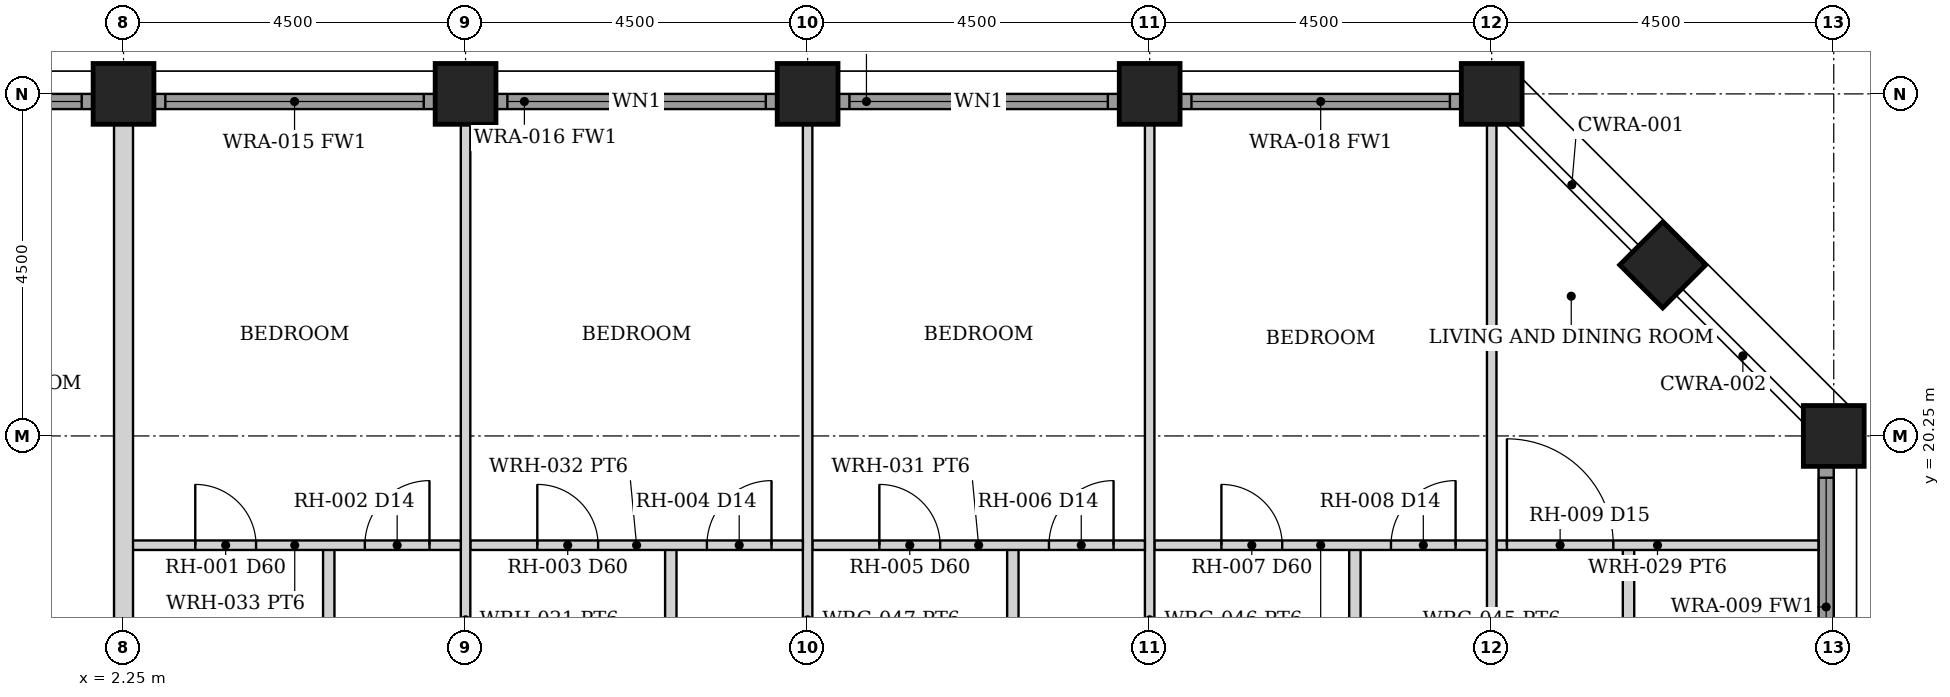
"""IFC4 building model, lengths in metres.
Left out: names, types, materials, properties, quantities, classifications, styles, units other than length and angle.
Written with IfcOpenShell. Run it as: python <this file> out.ifc"""

import sys

from ifc_helpers import new_model, si_unit, direction, frame, frame_2d, origin, origin_2d, place, context, subcontext, project, spatial, rectangle, hollow_rectangle, extrude, element, fill, save


model = new_model("IFC4")
c1 = context("Model", 3, precision=1e-05, world=origin(), true_north=direction((0.0, 1.0)))
c2 = subcontext(c1, "Body", "Model", "MODEL_VIEW")
j1 = project(units=[si_unit("LENGTHUNIT", "METRE"), si_unit("PLANEANGLEUNIT", "RADIAN")], contexts=[c1])
p1 = place(None, origin())
s1 = spatial("IfcSite", under=j1, at=p1, CompositionType="ELEMENT")
p2 = place(p1, origin())
s2 = spatial("IfcBuilding", under=s1, at=p2, CompositionType="ELEMENT")
p3 = place(p2, frame((0.0, 0.0, 100.0)))
s3 = spatial("IfcBuildingStorey", under=s2, at=p3, CompositionType="ELEMENT", Elevation=100.0)
for number, where, z_axis, x_axis in (
    (1, (2.25, 24.75, 0.0), (0.0, 0.0, 1.0), (0.0, 1.0, 0.0)),
    (2, (6.75, 24.75, 0.0), (0.0, 0.0, 1.0), (0.0, 1.0, 0.0)),
    (3, (11.25, 24.75, 0.0), (0.0, 0.0, 1.0), (0.0, 1.0, 0.0)),
    (4, (15.75, 24.75, 0.0), (0.0, 0.0, 1.0), (0.0, 1.0, 0.0)),
    (5, (20.25, 24.75, 0.0), (0.0, 0.0, 1.0), (0.0, 1.0, 0.0)),
    (6, (24.75, 20.25, 0.0), (0.0, 0.0, 1.0), (1.0, 0.0, 0.0)),
    (7, (22.5, 22.5, 0.0), (0.0, 0.0, 1.0), (0.707, 0.707, 0.0)),
):
    element("IfcColumn", number, at=place(p3, frame(where, z_axis=z_axis, x_axis=x_axis)), inside=s3, PredefinedType="COLUMN", context=c2, shape_type="SweptSolid", body=[
        extrude(hollow_rectangle(XDim=0.8, YDim=0.8, WallThickness=0.06, at=origin_2d()), origin(), (0.0, 0.0, 1.0), 3.5),
    ])
p4 = place(p3, frame((24.65, 16.155, 0.0), z_axis=(0.0, 0.0, 1.0), x_axis=(0.0, 1.0, 0.0)))
e8 = element("IfcWall", 8, at=p4, inside=s3, PredefinedType="SOLIDWALL", context=c2, shape_type="SweptSolid", body=[
    extrude(rectangle(XDim=3.69, YDim=0.2, at=frame_2d((1.845, 0.0))), origin(), (0.0, 0.0, 1.0), 2.379),
])
p5 = place(p4, frame((0.145, 0.0, 0.3)))
e9 = element("IfcOpeningElement", 9, at=p5, cuts=e8, PredefinedType="OPENING", context=c2, shape_type="SweptSolid", body=[
    extrude(rectangle(XDim=3.4, YDim=1.929, at=frame_2d((1.7, 0.964))), frame((0.0, 0.11, 0.0), z_axis=(0.0, -1.0, 0.0), x_axis=(1.0, 0.0, 0.0)), (0.0, 0.0, 1.0), 0.22),
])
p6 = place(p3, frame((-1.845, 24.65, 0.0), z_axis=(0.0, 0.0, 1.0), x_axis=(1.0, 0.0, 0.0)))
e10 = element("IfcWall", 10, at=p6, inside=s3, PredefinedType="SOLIDWALL", context=c2, shape_type="SweptSolid", body=[
    extrude(rectangle(XDim=3.69, YDim=0.2, at=frame_2d((1.845, 0.0))), origin(), (0.0, 0.0, 1.0), 2.379),
])
p7 = place(p6, frame((0.145, 0.0, 0.3)))
e11 = element("IfcOpeningElement", 11, at=p7, cuts=e10, PredefinedType="OPENING", context=c2, shape_type="SweptSolid", body=[
    extrude(rectangle(XDim=3.4, YDim=1.929, at=frame_2d((1.7, 0.964))), frame((0.0, 0.11, 0.0), z_axis=(0.0, -1.0, 0.0), x_axis=(1.0, 0.0, 0.0)), (0.0, 0.0, 1.0), 0.22),
])
p8 = place(p3, frame((2.655, 24.65, 0.0), z_axis=(0.0, 0.0, 1.0), x_axis=(1.0, 0.0, 0.0)))
e12 = element("IfcWall", 12, at=p8, inside=s3, PredefinedType="SOLIDWALL", context=c2, shape_type="SweptSolid", body=[
    extrude(rectangle(XDim=3.69, YDim=0.2, at=frame_2d((1.845, 0.0))), origin(), (0.0, 0.0, 1.0), 2.379),
])
p9 = place(p8, frame((0.145, 0.0, 0.3)))
e13 = element("IfcOpeningElement", 13, at=p9, cuts=e12, PredefinedType="OPENING", context=c2, shape_type="SweptSolid", body=[
    extrude(rectangle(XDim=3.4, YDim=1.929, at=frame_2d((1.7, 0.964))), frame((0.0, 0.11, 0.0), z_axis=(0.0, -1.0, 0.0), x_axis=(1.0, 0.0, 0.0)), (0.0, 0.0, 1.0), 0.22),
])
p10 = place(p3, frame((7.155, 24.65, 0.0), z_axis=(0.0, 0.0, 1.0), x_axis=(1.0, 0.0, 0.0)))
e14 = element("IfcWall", 14, at=p10, inside=s3, PredefinedType="SOLIDWALL", context=c2, shape_type="SweptSolid", body=[
    extrude(rectangle(XDim=3.69, YDim=0.2, at=frame_2d((1.845, 0.0))), origin(), (0.0, 0.0, 1.0), 2.379),
])
p11 = place(p10, frame((0.145, 0.0, 0.3)))
e15 = element("IfcOpeningElement", 15, at=p11, cuts=e14, PredefinedType="OPENING", context=c2, shape_type="SweptSolid", body=[
    extrude(rectangle(XDim=3.4, YDim=1.929, at=frame_2d((1.7, 0.964))), frame((0.0, 0.11, 0.0), z_axis=(0.0, -1.0, 0.0), x_axis=(1.0, 0.0, 0.0)), (0.0, 0.0, 1.0), 0.22),
])
p12 = place(p3, frame((11.655, 24.65, 0.0), z_axis=(0.0, 0.0, 1.0), x_axis=(1.0, 0.0, 0.0)))
e16 = element("IfcWall", 16, at=p12, inside=s3, PredefinedType="SOLIDWALL", context=c2, shape_type="SweptSolid", body=[
    extrude(rectangle(XDim=3.69, YDim=0.2, at=frame_2d((1.845, 0.0))), origin(), (0.0, 0.0, 1.0), 2.379),
])
p13 = place(p12, frame((0.145, 0.0, 0.3)))
e17 = element("IfcOpeningElement", 17, at=p13, cuts=e16, PredefinedType="OPENING", context=c2, shape_type="SweptSolid", body=[
    extrude(rectangle(XDim=3.4, YDim=1.929, at=frame_2d((1.7, 0.964))), frame((0.0, 0.11, 0.0), z_axis=(0.0, -1.0, 0.0), x_axis=(1.0, 0.0, 0.0)), (0.0, 0.0, 1.0), 0.22),
])
p14 = place(p3, frame((16.155, 24.65, 0.0), z_axis=(0.0, 0.0, 1.0), x_axis=(1.0, 0.0, 0.0)))
e18 = element("IfcWall", 18, at=p14, inside=s3, PredefinedType="SOLIDWALL", context=c2, shape_type="SweptSolid", body=[
    extrude(rectangle(XDim=3.69, YDim=0.2, at=frame_2d((1.845, 0.0))), origin(), (0.0, 0.0, 1.0), 2.379),
])
p15 = place(p14, frame((0.145, 0.0, 0.3)))
e19 = element("IfcOpeningElement", 19, at=p15, cuts=e18, PredefinedType="OPENING", context=c2, shape_type="SweptSolid", body=[
    extrude(rectangle(XDim=3.4, YDim=1.929, at=frame_2d((1.7, 0.964))), frame((0.0, 0.11, 0.0), z_axis=(0.0, -1.0, 0.0), x_axis=(1.0, 0.0, 0.0)), (0.0, 0.0, 1.0), 0.22),
])
p16 = place(p3, frame((22.05, 11.312, 0.0), z_axis=(0.0, 0.0, 1.0), x_axis=(0.0, 1.0, 0.0)))
e20 = element("IfcWall", 20, at=p16, inside=s3, PredefinedType="PARTITIONING", context=c2, shape_type="SweptSolid", body=[
    extrude(rectangle(XDim=7.5, YDim=0.15, at=frame_2d((3.75, 0.0))), origin(), (0.0, 0.0, 1.0), 2.373),
])
p17 = place(p16, frame((3.3, 0.0, 0.0)))
e21 = element("IfcOpeningElement", 21, at=p17, cuts=e20, PredefinedType="OPENING", context=c2, shape_type="SweptSolid", body=[
    extrude(rectangle(XDim=0.9, YDim=2.1, at=frame_2d((0.45, 1.05))), frame((0.0, 0.085, 0.0), z_axis=(0.0, -1.0, 0.0), x_axis=(1.0, 0.0, 0.0)), (0.0, 0.0, 1.0), 0.17),
])
p18 = place(p3, frame((20.312, 18.812, 0.0), z_axis=(0.0, 0.0, 1.0), x_axis=(1.0, 0.0, 0.0)))
e22 = element("IfcWall", 22, at=p18, inside=s3, PredefinedType="PARTITIONING", context=c2, shape_type="SweptSolid", body=[
    extrude(rectangle(XDim=4.238, YDim=0.125, at=frame_2d((2.119, 0.0))), origin(), (0.0, 0.0, 1.0), 2.373),
])
p19 = place(p18, frame((0.137, 0.0, 0.0)))
e23 = element("IfcOpeningElement", 23, at=p19, cuts=e22, PredefinedType="OPENING", context=c2, shape_type="SweptSolid", body=[
    extrude(rectangle(XDim=1.4, YDim=2.1, at=frame_2d((0.7, 1.05))), frame((0.0, 0.073, 0.0), z_axis=(0.0, -1.0, 0.0), x_axis=(1.0, 0.0, 0.0)), (0.0, 0.0, 1.0), 0.145),
])
p20 = place(p3, frame((20.25, 11.312, 0.0), z_axis=(0.0, 0.0, 1.0), x_axis=(0.0, 1.0, 0.0)))
e24 = element("IfcWall", 24, at=p20, inside=s3, PredefinedType="PARTITIONING", context=c2, shape_type="SweptSolid", body=[
    extrude(rectangle(XDim=13.038, YDim=0.125, at=frame_2d((6.519, 0.0))), origin(), (0.0, 0.0, 1.0), 2.373),
])
p21 = place(p3, frame((18.45, 11.312, 0.0), z_axis=(0.0, 0.0, 1.0), x_axis=(0.0, 1.0, 0.0)))
e25 = element("IfcWall", 25, at=p21, inside=s3, PredefinedType="PARTITIONING", context=c2, shape_type="SweptSolid", body=[
    extrude(rectangle(XDim=7.5, YDim=0.15, at=frame_2d((3.75, 0.0))), origin(), (0.0, 0.0, 1.0), 2.373),
])
p22 = place(p21, frame((0.9, 0.0, 0.0)))
e26 = element("IfcOpeningElement", 26, at=p22, cuts=e25, PredefinedType="OPENING", context=c2, shape_type="SweptSolid", body=[
    extrude(rectangle(XDim=0.8, YDim=2.1, at=frame_2d((0.4, 1.05))), frame((0.0, 0.085, 0.0), z_axis=(0.0, -1.0, 0.0), x_axis=(1.0, 0.0, 0.0)), (0.0, 0.0, 1.0), 0.17),
])
p23 = place(p3, frame((15.812, 18.812, 0.0), z_axis=(0.0, 0.0, 1.0), x_axis=(1.0, 0.0, 0.0)))
e27 = element("IfcWall", 27, at=p23, inside=s3, PredefinedType="PARTITIONING", context=c2, shape_type="SweptSolid", body=[
    extrude(rectangle(XDim=4.375, YDim=0.125, at=frame_2d((2.188, 0.0))), origin(), (0.0, 0.0, 1.0), 2.373),
])
p24 = place(p23, frame((3.113, 0.0, 0.0)))
e28 = element("IfcOpeningElement", 28, at=p24, cuts=e27, PredefinedType="OPENING", context=c2, shape_type="SweptSolid", body=[
    extrude(rectangle(XDim=0.85, YDim=2.1, at=frame_2d((0.425, 1.05))), frame((0.0, 0.073, 0.0), z_axis=(0.0, -1.0, 0.0), x_axis=(1.0, 0.0, 0.0)), (0.0, 0.0, 1.0), 0.145),
])
p25 = place(p23, frame((0.881, 0.0, 0.0)))
e29 = element("IfcOpeningElement", 29, at=p25, cuts=e27, PredefinedType="OPENING", context=c2, shape_type="SweptSolid", body=[
    extrude(rectangle(XDim=0.8, YDim=2.1, at=frame_2d((0.4, 1.05))), frame((0.0, 0.073, 0.0), z_axis=(0.0, -1.0, 0.0), x_axis=(1.0, 0.0, 0.0)), (0.0, 0.0, 1.0), 0.145),
])
p26 = place(p3, frame((15.75, 11.312, 0.0), z_axis=(0.0, 0.0, 1.0), x_axis=(0.0, 1.0, 0.0)))
e30 = element("IfcWall", 30, at=p26, inside=s3, PredefinedType="PARTITIONING", context=c2, shape_type="SweptSolid", body=[
    extrude(rectangle(XDim=13.038, YDim=0.125, at=frame_2d((6.519, 0.0))), origin(), (0.0, 0.0, 1.0), 2.373),
])
p27 = place(p3, frame((13.95, 11.312, 0.0), z_axis=(0.0, 0.0, 1.0), x_axis=(0.0, 1.0, 0.0)))
e31 = element("IfcWall", 31, at=p27, inside=s3, PredefinedType="PARTITIONING", context=c2, shape_type="SweptSolid", body=[
    extrude(rectangle(XDim=7.5, YDim=0.15, at=frame_2d((3.75, 0.0))), origin(), (0.0, 0.0, 1.0), 2.373),
])
p28 = place(p27, frame((0.9, 0.0, 0.0)))
e32 = element("IfcOpeningElement", 32, at=p28, cuts=e31, PredefinedType="OPENING", context=c2, shape_type="SweptSolid", body=[
    extrude(rectangle(XDim=0.8, YDim=2.1, at=frame_2d((0.4, 1.05))), frame((0.0, 0.085, 0.0), z_axis=(0.0, -1.0, 0.0), x_axis=(1.0, 0.0, 0.0)), (0.0, 0.0, 1.0), 0.17),
])
p29 = place(p3, frame((11.312, 18.812, 0.0), z_axis=(0.0, 0.0, 1.0), x_axis=(1.0, 0.0, 0.0)))
e33 = element("IfcWall", 33, at=p29, inside=s3, PredefinedType="PARTITIONING", context=c2, shape_type="SweptSolid", body=[
    extrude(rectangle(XDim=4.375, YDim=0.125, at=frame_2d((2.188, 0.0))), origin(), (0.0, 0.0, 1.0), 2.373),
])
p30 = place(p29, frame((3.113, 0.0, 0.0)))
e34 = element("IfcOpeningElement", 34, at=p30, cuts=e33, PredefinedType="OPENING", context=c2, shape_type="SweptSolid", body=[
    extrude(rectangle(XDim=0.85, YDim=2.1, at=frame_2d((0.425, 1.05))), frame((0.0, 0.073, 0.0), z_axis=(0.0, -1.0, 0.0), x_axis=(1.0, 0.0, 0.0)), (0.0, 0.0, 1.0), 0.145),
])
p31 = place(p29, frame((0.881, 0.0, 0.0)))
e35 = element("IfcOpeningElement", 35, at=p31, cuts=e33, PredefinedType="OPENING", context=c2, shape_type="SweptSolid", body=[
    extrude(rectangle(XDim=0.8, YDim=2.1, at=frame_2d((0.4, 1.05))), frame((0.0, 0.073, 0.0), z_axis=(0.0, -1.0, 0.0), x_axis=(1.0, 0.0, 0.0)), (0.0, 0.0, 1.0), 0.145),
])
p32 = place(p3, frame((11.25, 11.312, 0.0), z_axis=(0.0, 0.0, 1.0), x_axis=(0.0, 1.0, 0.0)))
e36 = element("IfcWall", 36, at=p32, inside=s3, PredefinedType="PARTITIONING", context=c2, shape_type="SweptSolid", body=[
    extrude(rectangle(XDim=13.038, YDim=0.125, at=frame_2d((6.519, 0.0))), origin(), (0.0, 0.0, 1.0), 2.373),
])
p33 = place(p3, frame((9.45, 11.312, 0.0), z_axis=(0.0, 0.0, 1.0), x_axis=(0.0, 1.0, 0.0)))
e37 = element("IfcWall", 37, at=p33, inside=s3, PredefinedType="PARTITIONING", context=c2, shape_type="SweptSolid", body=[
    extrude(rectangle(XDim=7.5, YDim=0.15, at=frame_2d((3.75, 0.0))), origin(), (0.0, 0.0, 1.0), 2.373),
])
p34 = place(p33, frame((0.9, 0.0, 0.0)))
e38 = element("IfcOpeningElement", 38, at=p34, cuts=e37, PredefinedType="OPENING", context=c2, shape_type="SweptSolid", body=[
    extrude(rectangle(XDim=0.8, YDim=2.1, at=frame_2d((0.4, 1.05))), frame((0.0, 0.085, 0.0), z_axis=(0.0, -1.0, 0.0), x_axis=(1.0, 0.0, 0.0)), (0.0, 0.0, 1.0), 0.17),
])
p35 = place(p3, frame((6.812, 18.812, 0.0), z_axis=(0.0, 0.0, 1.0), x_axis=(1.0, 0.0, 0.0)))
e39 = element("IfcWall", 39, at=p35, inside=s3, PredefinedType="PARTITIONING", context=c2, shape_type="SweptSolid", body=[
    extrude(rectangle(XDim=4.375, YDim=0.125, at=frame_2d((2.188, 0.0))), origin(), (0.0, 0.0, 1.0), 2.373),
])
p36 = place(p35, frame((3.113, 0.0, 0.0)))
e40 = element("IfcOpeningElement", 40, at=p36, cuts=e39, PredefinedType="OPENING", context=c2, shape_type="SweptSolid", body=[
    extrude(rectangle(XDim=0.85, YDim=2.1, at=frame_2d((0.425, 1.05))), frame((0.0, 0.073, 0.0), z_axis=(0.0, -1.0, 0.0), x_axis=(1.0, 0.0, 0.0)), (0.0, 0.0, 1.0), 0.145),
])
p37 = place(p35, frame((0.881, 0.0, 0.0)))
e41 = element("IfcOpeningElement", 41, at=p37, cuts=e39, PredefinedType="OPENING", context=c2, shape_type="SweptSolid", body=[
    extrude(rectangle(XDim=0.8, YDim=2.1, at=frame_2d((0.4, 1.05))), frame((0.0, 0.073, 0.0), z_axis=(0.0, -1.0, 0.0), x_axis=(1.0, 0.0, 0.0)), (0.0, 0.0, 1.0), 0.145),
])
p38 = place(p3, frame((6.75, 11.312, 0.0), z_axis=(0.0, 0.0, 1.0), x_axis=(0.0, 1.0, 0.0)))
e42 = element("IfcWall", 42, at=p38, inside=s3, PredefinedType="PARTITIONING", context=c2, shape_type="SweptSolid", body=[
    extrude(rectangle(XDim=13.038, YDim=0.125, at=frame_2d((6.519, 0.0))), origin(), (0.0, 0.0, 1.0), 2.373),
])
p39 = place(p3, frame((4.95, 11.312, 0.0), z_axis=(0.0, 0.0, 1.0), x_axis=(0.0, 1.0, 0.0)))
e43 = element("IfcWall", 43, at=p39, inside=s3, PredefinedType="PARTITIONING", context=c2, shape_type="SweptSolid", body=[
    extrude(rectangle(XDim=7.5, YDim=0.15, at=frame_2d((3.75, 0.0))), origin(), (0.0, 0.0, 1.0), 2.373),
])
p40 = place(p39, frame((0.9, 0.0, 0.0)))
e44 = element("IfcOpeningElement", 44, at=p40, cuts=e43, PredefinedType="OPENING", context=c2, shape_type="SweptSolid", body=[
    extrude(rectangle(XDim=0.8, YDim=2.1, at=frame_2d((0.4, 1.05))), frame((0.0, 0.085, 0.0), z_axis=(0.0, -1.0, 0.0), x_axis=(1.0, 0.0, 0.0)), (0.0, 0.0, 1.0), 0.17),
])
p41 = place(p3, frame((2.317, 18.812, 0.0), z_axis=(0.0, 0.0, 1.0), x_axis=(1.0, 0.0, 0.0)))
e45 = element("IfcWall", 45, at=p41, inside=s3, PredefinedType="PARTITIONING", context=c2, shape_type="SweptSolid", body=[
    extrude(rectangle(XDim=4.37, YDim=0.125, at=frame_2d((2.185, 0.0))), origin(), (0.0, 0.0, 1.0), 2.373),
])
p42 = place(p41, frame((3.107, 0.0, 0.0)))
e46 = element("IfcOpeningElement", 46, at=p42, cuts=e45, PredefinedType="OPENING", context=c2, shape_type="SweptSolid", body=[
    extrude(rectangle(XDim=0.85, YDim=2.1, at=frame_2d((0.425, 1.05))), frame((0.0, 0.073, 0.0), z_axis=(0.0, -1.0, 0.0), x_axis=(1.0, 0.0, 0.0)), (0.0, 0.0, 1.0), 0.145),
])
p43 = place(p41, frame((0.876, 0.0, 0.0)))
e47 = element("IfcOpeningElement", 47, at=p43, cuts=e45, PredefinedType="OPENING", context=c2, shape_type="SweptSolid", body=[
    extrude(rectangle(XDim=0.8, YDim=2.1, at=frame_2d((0.4, 1.05))), frame((0.0, 0.073, 0.0), z_axis=(0.0, -1.0, 0.0), x_axis=(1.0, 0.0, 0.0)), (0.0, 0.0, 1.0), 0.145),
])
p44 = place(p3, frame((2.25, 9.2, 0.0), z_axis=(0.0, 0.0, 1.0), x_axis=(0.0, 1.0, 0.0)))
e48 = element("IfcWall", 48, at=p44, inside=s3, PredefinedType="PARTITIONING", context=c2, shape_type="SweptSolid", body=[
    extrude(rectangle(XDim=15.15, YDim=0.25, at=frame_2d((7.575, 0.0))), origin(), (0.0, 0.0, 1.0), 2.373),
])
p45 = place(p5, origin())
e49 = element("IfcWindow", 49, at=p45, inside=s3, PartitioningType="SINGLE_PANEL", PredefinedType="WINDOW", context=c2, shape_type="SweptSolid", body=[
    extrude(rectangle(XDim=3.4, YDim=1.929, at=frame_2d((1.7, 0.964))), frame((0.0, 0.03, 0.0), z_axis=(0.0, -1.0, 0.0), x_axis=(1.0, 0.0, 0.0)), (0.0, 0.0, 1.0), 0.06),
])
fill(e9, e49)
p46 = place(p7, origin())
e50 = element("IfcWindow", 50, at=p46, inside=s3, PartitioningType="SINGLE_PANEL", PredefinedType="WINDOW", context=c2, shape_type="SweptSolid", body=[
    extrude(rectangle(XDim=3.4, YDim=1.929, at=frame_2d((1.7, 0.964))), frame((0.0, 0.03, 0.0), z_axis=(0.0, -1.0, 0.0), x_axis=(1.0, 0.0, 0.0)), (0.0, 0.0, 1.0), 0.06),
])
fill(e11, e50)
p47 = place(p9, origin())
e51 = element("IfcWindow", 51, at=p47, inside=s3, PartitioningType="SINGLE_PANEL", PredefinedType="WINDOW", context=c2, shape_type="SweptSolid", body=[
    extrude(rectangle(XDim=3.4, YDim=1.929, at=frame_2d((1.7, 0.964))), frame((0.0, 0.03, 0.0), z_axis=(0.0, -1.0, 0.0), x_axis=(1.0, 0.0, 0.0)), (0.0, 0.0, 1.0), 0.06),
])
fill(e13, e51)
p48 = place(p11, origin())
e52 = element("IfcWindow", 52, at=p48, inside=s3, PartitioningType="SINGLE_PANEL", PredefinedType="WINDOW", context=c2, shape_type="SweptSolid", body=[
    extrude(rectangle(XDim=3.4, YDim=1.929, at=frame_2d((1.7, 0.964))), frame((0.0, 0.03, 0.0), z_axis=(0.0, -1.0, 0.0), x_axis=(1.0, 0.0, 0.0)), (0.0, 0.0, 1.0), 0.06),
])
fill(e15, e52)
p49 = place(p13, origin())
e53 = element("IfcWindow", 53, at=p49, inside=s3, PartitioningType="SINGLE_PANEL", PredefinedType="WINDOW", context=c2, shape_type="SweptSolid", body=[
    extrude(rectangle(XDim=3.4, YDim=1.929, at=frame_2d((1.7, 0.964))), frame((0.0, 0.03, 0.0), z_axis=(0.0, -1.0, 0.0), x_axis=(1.0, 0.0, 0.0)), (0.0, 0.0, 1.0), 0.06),
])
fill(e17, e53)
p50 = place(p15, origin())
e54 = element("IfcWindow", 54, at=p50, inside=s3, PartitioningType="SINGLE_PANEL", PredefinedType="WINDOW", context=c2, shape_type="SweptSolid", body=[
    extrude(rectangle(XDim=3.4, YDim=1.929, at=frame_2d((1.7, 0.964))), frame((0.0, 0.03, 0.0), z_axis=(0.0, -1.0, 0.0), x_axis=(1.0, 0.0, 0.0)), (0.0, 0.0, 1.0), 0.06),
])
fill(e19, e54)
p51 = place(p19, origin())
e55 = element("IfcDoor", 55, at=p51, inside=s3, OperationType="SINGLE_SWING_LEFT", PredefinedType="DOOR", context=c2, shape_type="SweptSolid", body=[
    extrude(rectangle(XDim=1.4, YDim=2.1, at=frame_2d((0.7, 1.05))), frame((0.0, 0.025, 0.0), z_axis=(0.0, -1.0, 0.0), x_axis=(1.0, 0.0, 0.0)), (0.0, 0.0, 1.0), 0.05),
])
fill(e23, e55)
p52 = place(p24, origin())
e56 = element("IfcDoor", 56, at=p52, inside=s3, OperationType="SINGLE_SWING_RIGHT", PredefinedType="DOOR", context=c2, shape_type="SweptSolid", body=[
    extrude(rectangle(XDim=0.85, YDim=2.1, at=frame_2d((0.425, 1.05))), frame((0.0, 0.025, 0.0), z_axis=(0.0, -1.0, 0.0), x_axis=(1.0, 0.0, 0.0)), (0.0, 0.0, 1.0), 0.05),
])
fill(e28, e56)
p53 = place(p25, origin())
e57 = element("IfcDoor", 57, at=p53, inside=s3, OperationType="SINGLE_SWING_LEFT", PredefinedType="DOOR", context=c2, shape_type="SweptSolid", body=[
    extrude(rectangle(XDim=0.8, YDim=2.1, at=frame_2d((0.4, 1.05))), frame((0.0, 0.025, 0.0), z_axis=(0.0, -1.0, 0.0), x_axis=(1.0, 0.0, 0.0)), (0.0, 0.0, 1.0), 0.05),
])
fill(e29, e57)
p54 = place(p30, origin())
e58 = element("IfcDoor", 58, at=p54, inside=s3, OperationType="SINGLE_SWING_RIGHT", PredefinedType="DOOR", context=c2, shape_type="SweptSolid", body=[
    extrude(rectangle(XDim=0.85, YDim=2.1, at=frame_2d((0.425, 1.05))), frame((0.0, 0.025, 0.0), z_axis=(0.0, -1.0, 0.0), x_axis=(1.0, 0.0, 0.0)), (0.0, 0.0, 1.0), 0.05),
])
fill(e34, e58)
p55 = place(p31, origin())
e59 = element("IfcDoor", 59, at=p55, inside=s3, OperationType="SINGLE_SWING_LEFT", PredefinedType="DOOR", context=c2, shape_type="SweptSolid", body=[
    extrude(rectangle(XDim=0.8, YDim=2.1, at=frame_2d((0.4, 1.05))), frame((0.0, 0.025, 0.0), z_axis=(0.0, -1.0, 0.0), x_axis=(1.0, 0.0, 0.0)), (0.0, 0.0, 1.0), 0.05),
])
fill(e35, e59)
p56 = place(p36, origin())
e60 = element("IfcDoor", 60, at=p56, inside=s3, OperationType="SINGLE_SWING_RIGHT", PredefinedType="DOOR", context=c2, shape_type="SweptSolid", body=[
    extrude(rectangle(XDim=0.85, YDim=2.1, at=frame_2d((0.425, 1.05))), frame((0.0, 0.025, 0.0), z_axis=(0.0, -1.0, 0.0), x_axis=(1.0, 0.0, 0.0)), (0.0, 0.0, 1.0), 0.05),
])
fill(e40, e60)
p57 = place(p37, origin())
e61 = element("IfcDoor", 61, at=p57, inside=s3, OperationType="SINGLE_SWING_LEFT", PredefinedType="DOOR", context=c2, shape_type="SweptSolid", body=[
    extrude(rectangle(XDim=0.8, YDim=2.1, at=frame_2d((0.4, 1.05))), frame((0.0, 0.025, 0.0), z_axis=(0.0, -1.0, 0.0), x_axis=(1.0, 0.0, 0.0)), (0.0, 0.0, 1.0), 0.05),
])
fill(e41, e61)
p58 = place(p42, origin())
e62 = element("IfcDoor", 62, at=p58, inside=s3, OperationType="SINGLE_SWING_RIGHT", PredefinedType="DOOR", context=c2, shape_type="SweptSolid", body=[
    extrude(rectangle(XDim=0.85, YDim=2.1, at=frame_2d((0.425, 1.05))), frame((0.0, 0.025, 0.0), z_axis=(0.0, -1.0, 0.0), x_axis=(1.0, 0.0, 0.0)), (0.0, 0.0, 1.0), 0.05),
])
fill(e46, e62)
p59 = place(p43, origin())
e63 = element("IfcDoor", 63, at=p59, inside=s3, OperationType="SINGLE_SWING_LEFT", PredefinedType="DOOR", context=c2, shape_type="SweptSolid", body=[
    extrude(rectangle(XDim=0.8, YDim=2.1, at=frame_2d((0.4, 1.05))), frame((0.0, 0.025, 0.0), z_axis=(0.0, -1.0, 0.0), x_axis=(1.0, 0.0, 0.0)), (0.0, 0.0, 1.0), 0.05),
])
fill(e47, e63)
save(model, sys.argv[1])
